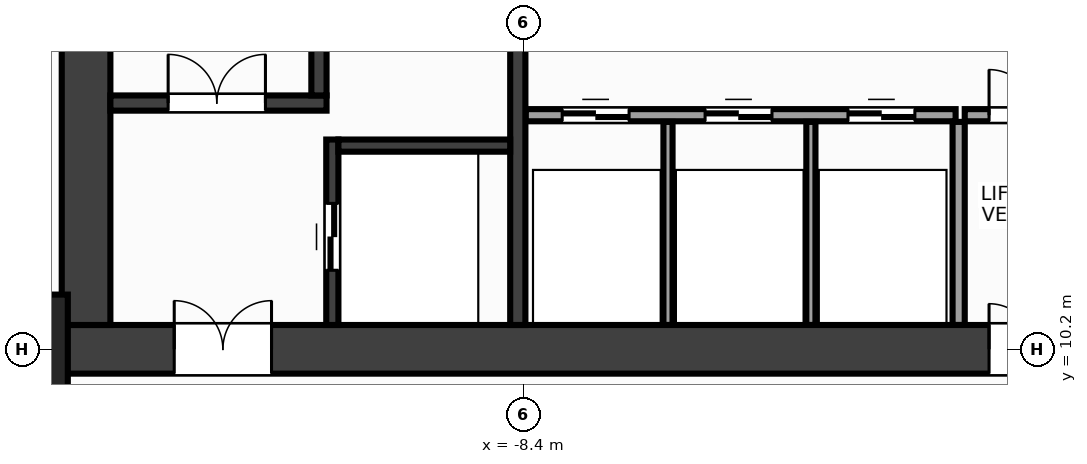
"""IFC4 building model, lengths in metres.
Left out: names, types, materials, properties, quantities, classifications, styles, units other than length and angle.
Written with IfcOpenShell. Run it as: python <this file> out.ifc"""

import sys

from ifc_helpers import new_model, si_unit, direction, frame, frame_2d, origin, origin_2d, place, context, subcontext, project, spatial, rectangle, extrude, source, transform, mapped, element, fill, save


model = new_model("IFC4")
c1 = context("Model", 3, precision=1e-05, world=origin(), true_north=direction((0.0, 1.0)))
c2 = subcontext(c1, "Body", "Model", "MODEL_VIEW")
j1 = project(units=[si_unit("LENGTHUNIT", "METRE"), si_unit("PLANEANGLEUNIT", "RADIAN")], contexts=[c1])
p1 = place(None, origin())
s1 = spatial("IfcSite", under=j1, at=p1, CompositionType="ELEMENT")
p2 = place(p1, origin())
s2 = spatial("IfcBuilding", under=s1, at=p2, CompositionType="ELEMENT")
p3 = place(p2, frame((0.0, 0.0, 48.8)))
s3 = spatial("IfcBuildingStorey", under=s2, at=p3, CompositionType="ELEMENT", Elevation=48.8)
m1 = source(origin(), c2, "Body", "SweptSolid", [
    extrude(rectangle(XDim=32.0, YDim=0.8, at=frame_2d((16.0, 0.0))), origin(), (0.0, 0.0, 1.0), 3.6),
])
p4 = place(p3, frame((-16.0, 10.2, 0.0), z_axis=(0.0, 0.0, 1.0), x_axis=(1.0, 0.0, 0.0)))
e1 = element("IfcWall", 1, at=p4, inside=s3, PredefinedType="SHEAR", context=c2, shape_type="MappedRepresentation", body=[
    mapped(m1, transform((0.0, 0.0, 0.0), x_axis=(1.0, 0.0, 0.0), y_axis=(0.0, 1.0, 0.0), z_axis=(0.0, 0.0, 1.0), scale=1.0)),
])
p5 = place(p4, frame((1.85, 0.0, 0.0)))
e2 = element("IfcOpeningElement", 2, at=p5, cuts=e1, PredefinedType="OPENING", context=c2, shape_type="SweptSolid", body=[
    extrude(rectangle(XDim=1.6, YDim=2.15, at=frame_2d((0.8, 1.075))), frame((0.0, 0.412, 0.0), z_axis=(0.0, -1.0, 0.0), x_axis=(1.0, 0.0, 0.0)), (0.0, 0.0, 1.0), 0.824),
])
p6 = place(p4, frame((28.55, 0.0, 0.0)))
e3 = element("IfcOpeningElement", 3, at=p6, cuts=e1, PredefinedType="OPENING", context=c2, shape_type="SweptSolid", body=[
    extrude(rectangle(XDim=1.6, YDim=2.15, at=frame_2d((0.8, 1.075))), frame((0.0, 0.412, 0.0), z_axis=(0.0, -1.0, 0.0), x_axis=(1.0, 0.0, 0.0)), (0.0, 0.0, 1.0), 0.824),
])
p7 = place(p4, frame((15.25, 0.0, 0.0)))
e4 = element("IfcOpeningElement", 4, at=p7, cuts=e1, PredefinedType="OPENING", context=c2, shape_type="SweptSolid", body=[
    extrude(rectangle(XDim=1.5, YDim=2.2, at=frame_2d((0.75, 1.1))), frame((0.0, 0.412, 0.0), z_axis=(0.0, -1.0, 0.0), x_axis=(1.0, 0.0, 0.0)), (0.0, 0.0, 1.0), 0.824),
])
m2 = source(origin(), c2, "Body", "SweptSolid", [
    extrude(rectangle(XDim=12.8, YDim=0.8, at=frame_2d((6.4, 0.0))), origin(), (0.0, 0.0, 1.0), 3.6),
])
p8 = place(p3, frame((-15.6, 10.6, 0.0), z_axis=(0.0, 0.0, 1.0), x_axis=(0.0, 1.0, 0.0)))
e5 = element("IfcWall", 5, at=p8, inside=s3, PredefinedType="SHEAR", context=c2, shape_type="MappedRepresentation", body=[
    mapped(m2, transform((0.0, 0.0, 0.0), x_axis=(1.0, 0.0, 0.0), y_axis=(0.0, 1.0, 0.0), z_axis=(0.0, 0.0, 1.0), scale=1.0)),
])
m3 = source(origin(), c2, "Body", "SweptSolid", [
    extrude(rectangle(XDim=12.8, YDim=0.25, at=frame_2d((6.4, 0.0))), origin(), (0.0, 0.0, 1.0), 3.6),
])
p9 = place(p3, frame((-8.5, 10.6, 0.0), z_axis=(0.0, 0.0, 1.0), x_axis=(0.0, 1.0, 0.0)))
e6 = element("IfcWall", 6, at=p9, inside=s3, PredefinedType="SHEAR", context=c2, shape_type="MappedRepresentation", body=[
    mapped(m3, transform((0.0, 0.0, 0.0), x_axis=(1.0, 0.0, 0.0), y_axis=(0.0, 1.0, 0.0), z_axis=(0.0, 0.0, 1.0), scale=1.0)),
])
p10 = place(p9, frame((5.9, 0.0, 0.0)))
e7 = element("IfcOpeningElement", 7, at=p10, cuts=e6, PredefinedType="OPENING", context=c2, shape_type="SweptSolid", body=[
    extrude(rectangle(XDim=0.95, YDim=2.15, at=frame_2d((0.475, 1.075))), frame((0.0, 0.137, 0.0), z_axis=(0.0, -1.0, 0.0), x_axis=(1.0, 0.0, 0.0)), (0.0, 0.0, 1.0), 0.274),
])
m4 = source(origin(), c2, "Body", "SweptSolid", [
    extrude(rectangle(XDim=3.555, YDim=0.25, at=frame_2d((1.777, 0.0))), origin(), (0.0, 0.0, 1.0), 3.6),
])
p11 = place(p3, frame((-15.2, 14.25, 0.0), z_axis=(0.0, 0.0, 1.0), x_axis=(1.0, 0.0, 0.0)))
e8 = element("IfcWall", 8, at=p11, inside=s3, PredefinedType="SHEAR", context=c2, shape_type="MappedRepresentation", body=[
    mapped(m4, transform((0.0, 0.0, 0.0), x_axis=(1.0, 0.0, 0.0), y_axis=(0.0, 1.0, 0.0), z_axis=(0.0, 0.0, 1.0), scale=1.0)),
])
p12 = place(p11, frame((0.95, 0.0, 0.0)))
e9 = element("IfcOpeningElement", 9, at=p12, cuts=e8, PredefinedType="OPENING", context=c2, shape_type="SweptSolid", body=[
    extrude(rectangle(XDim=1.6, YDim=2.15, at=frame_2d((0.8, 1.075))), frame((0.0, 0.137, 0.0), z_axis=(0.0, -1.0, 0.0), x_axis=(1.0, 0.0, 0.0)), (0.0, 0.0, 1.0), 0.274),
])
m5 = source(origin(), c2, "Body", "SweptSolid", [
    extrude(rectangle(XDim=9.025, YDim=0.25, at=frame_2d((4.512, 0.0))), origin(), (0.0, 0.0, 1.0), 3.6),
])
p13 = place(p3, frame((-11.77, 14.375, 0.0), z_axis=(0.0, 0.0, 1.0), x_axis=(0.0, 1.0, 0.0)))
e10 = element("IfcWall", 10, at=p13, inside=s3, PredefinedType="SHEAR", context=c2, shape_type="MappedRepresentation", body=[
    mapped(m5, transform((0.0, 0.0, 0.0), x_axis=(1.0, 0.0, 0.0), y_axis=(0.0, 1.0, 0.0), z_axis=(0.0, 0.0, 1.0), scale=1.0)),
])
m6 = source(origin(), c2, "Body", "SweptSolid", [
    extrude(rectangle(XDim=3.05, YDim=0.2, at=frame_2d((1.525, 0.0))), origin(), (0.0, 0.0, 1.0), 3.6),
])
p14 = place(p3, frame((-11.55, 10.6, 0.0), z_axis=(0.0, 0.0, 1.0), x_axis=(0.0, 1.0, 0.0)))
e11 = element("IfcWall", 11, at=p14, inside=s3, PredefinedType="SHEAR", context=c2, shape_type="MappedRepresentation", body=[
    mapped(m6, transform((0.0, 0.0, 0.0), x_axis=(1.0, 0.0, 0.0), y_axis=(0.0, 1.0, 0.0), z_axis=(0.0, 0.0, 1.0), scale=1.0)),
])
p15 = place(p14, frame((0.9, 0.0, 0.0)))
e12 = element("IfcOpeningElement", 12, at=p15, cuts=e11, PredefinedType="OPENING", context=c2, shape_type="SweptSolid", body=[
    extrude(rectangle(XDim=1.1, YDim=2.15, at=frame_2d((0.55, 1.075))), frame((0.0, 0.112, 0.0), z_axis=(0.0, -1.0, 0.0), x_axis=(1.0, 0.0, 0.0)), (0.0, 0.0, 1.0), 0.224),
])
m7 = source(origin(), c2, "Body", "SweptSolid", [
    extrude(rectangle(XDim=2.825, YDim=0.2, at=frame_2d((1.413, 0.0))), origin(), (0.0, 0.0, 1.0), 3.6),
])
p16 = place(p3, frame((-11.45, 13.55, 0.0), z_axis=(0.0, 0.0, 1.0), x_axis=(1.0, 0.0, 0.0)))
e13 = element("IfcWall", 13, at=p16, inside=s3, PredefinedType="SHEAR", context=c2, shape_type="MappedRepresentation", body=[
    mapped(m7, transform((0.0, 0.0, 0.0), x_axis=(1.0, 0.0, 0.0), y_axis=(0.0, 1.0, 0.0), z_axis=(0.0, 0.0, 1.0), scale=1.0)),
])
m8 = source(origin(), c2, "Body", "SweptSolid", [
    extrude(rectangle(XDim=1.8, YDim=1.8, at=origin_2d()), origin(), (0.0, 0.0, 1.0), 3.6),
])
p17 = place(p3, frame((-16.8, 10.2, 0.0), z_axis=(0.0, 0.0, 1.0), x_axis=(1.0, 0.0, 0.0)))
e14 = element("IfcColumn", 14, at=p17, inside=s3, PredefinedType="COLUMN", context=c2, shape_type="MappedRepresentation", body=[
    mapped(m8, transform((0.0, 0.0, 0.0), x_axis=(1.0, 0.0, 0.0), y_axis=(0.0, 1.0, 0.0), z_axis=(0.0, 0.0, 1.0), scale=1.0)),
])
m9 = source(origin(), c2, "Body", "SweptSolid", [
    extrude(rectangle(XDim=7.07, YDim=0.2, at=frame_2d((3.535, 0.0))), origin(), (0.0, 0.0, 1.0), 3.36),
])
p18 = place(p3, frame((-8.37, 14.05, 0.0), z_axis=(0.0, 0.0, 1.0), x_axis=(1.0, 0.0, 0.0)))
e15 = element("IfcWall", 15, at=p18, inside=s3, PredefinedType="PARTITIONING", context=c2, shape_type="MappedRepresentation", body=[
    mapped(m9, transform((0.0, 0.0, 0.0), x_axis=(1.0, 0.0, 0.0), y_axis=(0.0, 1.0, 0.0), z_axis=(0.0, 0.0, 1.0), scale=1.0)),
])
p19 = place(p18, frame((0.6, 0.0, 0.0)))
e16 = element("IfcOpeningElement", 16, at=p19, cuts=e15, PredefinedType="OPENING", context=c2, shape_type="SweptSolid", body=[
    extrude(rectangle(XDim=1.1, YDim=2.15, at=frame_2d((0.55, 1.075))), frame((0.0, 0.112, 0.0), z_axis=(0.0, -1.0, 0.0), x_axis=(1.0, 0.0, 0.0)), (0.0, 0.0, 1.0), 0.224),
])
p20 = place(p18, frame((2.95, 0.0, 0.0)))
e17 = element("IfcOpeningElement", 17, at=p20, cuts=e15, PredefinedType="OPENING", context=c2, shape_type="SweptSolid", body=[
    extrude(rectangle(XDim=1.1, YDim=2.15, at=frame_2d((0.55, 1.075))), frame((0.0, 0.112, 0.0), z_axis=(0.0, -1.0, 0.0), x_axis=(1.0, 0.0, 0.0)), (0.0, 0.0, 1.0), 0.224),
])
p21 = place(p18, frame((5.3, 0.0, 0.0)))
e18 = element("IfcOpeningElement", 18, at=p21, cuts=e15, PredefinedType="OPENING", context=c2, shape_type="SweptSolid", body=[
    extrude(rectangle(XDim=1.1, YDim=2.15, at=frame_2d((0.55, 1.075))), frame((0.0, 0.112, 0.0), z_axis=(0.0, -1.0, 0.0), x_axis=(1.0, 0.0, 0.0)), (0.0, 0.0, 1.0), 0.224),
])
m10 = source(origin(), c2, "Body", "SweptSolid", [
    extrude(rectangle(XDim=3.34, YDim=0.2, at=frame_2d((1.67, 0.0))), origin(), (0.0, 0.0, 1.0), 3.36),
])
p22 = place(p3, frame((-1.25, 10.6, 0.0), z_axis=(0.0, 0.0, 1.0), x_axis=(0.0, 1.0, 0.0)))
e19 = element("IfcWall", 19, at=p22, inside=s3, PredefinedType="PARTITIONING", context=c2, shape_type="MappedRepresentation", body=[
    mapped(m10, transform((0.0, 0.0, 0.0), x_axis=(1.0, 0.0, 0.0), y_axis=(0.0, 1.0, 0.0), z_axis=(0.0, 0.0, 1.0), scale=1.0)),
])
m11 = source(origin(), c2, "Body", "SweptSolid", [
    extrude(rectangle(XDim=2.3, YDim=0.2, at=frame_2d((1.15, 0.0))), origin(), (0.0, 0.0, 1.0), 3.36),
])
p23 = place(p3, frame((-1.15, 14.05, 0.0), z_axis=(0.0, 0.0, 1.0), x_axis=(1.0, 0.0, 0.0)))
e20 = element("IfcWall", 20, at=p23, inside=s3, PredefinedType="PARTITIONING", context=c2, shape_type="MappedRepresentation", body=[
    mapped(m11, transform((0.0, 0.0, 0.0), x_axis=(1.0, 0.0, 0.0), y_axis=(0.0, 1.0, 0.0), z_axis=(0.0, 0.0, 1.0), scale=1.0)),
])
p24 = place(p23, frame((0.4, 0.0, 0.0)))
e21 = element("IfcOpeningElement", 21, at=p24, cuts=e20, PredefinedType="OPENING", context=c2, shape_type="SweptSolid", body=[
    extrude(rectangle(XDim=1.5, YDim=2.2, at=frame_2d((0.75, 1.1))), frame((0.0, 0.112, 0.0), z_axis=(0.0, -1.0, 0.0), x_axis=(1.0, 0.0, 0.0)), (0.0, 0.0, 1.0), 0.224),
])
m12 = source(origin(), c2, "Body", "SweptSolid", [
    extrude(rectangle(XDim=3.34, YDim=0.15, at=frame_2d((1.67, 0.0))), origin(), (0.0, 0.0, 1.0), 3.36),
])
for number, where, z_axis, x_axis in (
    (22, (-6.03, 10.6, 0.0), (0.0, 0.0, 1.0), (0.0, 1.0, 0.0)),
    (23, (-3.68, 10.6, 0.0), (0.0, 0.0, 1.0), (0.0, 1.0, 0.0)),
):
    element("IfcWall", number, at=place(p3, frame(where, z_axis=z_axis, x_axis=x_axis)), inside=s3, PredefinedType="PARTITIONING", context=c2, shape_type="MappedRepresentation", body=[
        mapped(m12, transform((0.0, 0.0, 0.0), x_axis=(1.0, 0.0, 0.0), y_axis=(0.0, 1.0, 0.0), z_axis=(0.0, 0.0, 1.0), scale=1.0)),
    ])
m13 = source(origin(), c2, "Body", "SweptSolid", [
    extrude(rectangle(XDim=1.6, YDim=2.15, at=frame_2d((0.8, 1.075))), frame((0.0, 0.025, 0.0), z_axis=(0.0, -1.0, 0.0), x_axis=(1.0, 0.0, 0.0)), (0.0, 0.0, 1.0), 0.05),
])
p25 = place(p12, origin())
e24 = element("IfcDoor", 24, at=p25, inside=s3, OperationType="DOUBLE_DOOR_SINGLE_SWING", PredefinedType="DOOR", context=c2, shape_type="MappedRepresentation", body=[
    mapped(m13, transform((0.0, 0.0, 0.0), x_axis=(1.0, 0.0, 0.0), y_axis=(0.0, 1.0, 0.0), z_axis=(0.0, 0.0, 1.0), scale=1.0)),
])
fill(e9, e24)
p26 = place(p5, origin())
e25 = element("IfcDoor", 25, at=p26, inside=s3, OperationType="DOUBLE_DOOR_SINGLE_SWING", PredefinedType="DOOR", context=c2, shape_type="MappedRepresentation", body=[
    mapped(m13, transform((0.0, 0.0, 0.0), x_axis=(1.0, 0.0, 0.0), y_axis=(0.0, 1.0, 0.0), z_axis=(0.0, 0.0, 1.0), scale=1.0)),
])
fill(e2, e25)
m14 = source(origin(), c2, "Body", "SweptSolid", [
    extrude(rectangle(XDim=1.1, YDim=2.15, at=frame_2d((0.55, 1.075))), frame((0.0, 0.025, 0.0), z_axis=(0.0, -1.0, 0.0), x_axis=(1.0, 0.0, 0.0)), (0.0, 0.0, 1.0), 0.05),
])
p27 = place(p15, origin())
e26 = element("IfcDoor", 26, at=p27, inside=s3, OperationType="DOUBLE_DOOR_SLIDING", PredefinedType="DOOR", context=c2, shape_type="MappedRepresentation", body=[
    mapped(m14, transform((0.0, 0.0, 0.0), x_axis=(1.0, 0.0, 0.0), y_axis=(0.0, 1.0, 0.0), z_axis=(0.0, 0.0, 1.0), scale=1.0)),
])
fill(e12, e26)
p28 = place(p19, origin())
e27 = element("IfcDoor", 27, at=p28, inside=s3, OperationType="DOUBLE_DOOR_SLIDING", PredefinedType="DOOR", context=c2, shape_type="MappedRepresentation", body=[
    mapped(m14, transform((0.0, 0.0, 0.0), x_axis=(1.0, 0.0, 0.0), y_axis=(0.0, 1.0, 0.0), z_axis=(0.0, 0.0, 1.0), scale=1.0)),
])
fill(e16, e27)
p29 = place(p20, origin())
e28 = element("IfcDoor", 28, at=p29, inside=s3, OperationType="DOUBLE_DOOR_SLIDING", PredefinedType="DOOR", context=c2, shape_type="MappedRepresentation", body=[
    mapped(m14, transform((0.0, 0.0, 0.0), x_axis=(1.0, 0.0, 0.0), y_axis=(0.0, 1.0, 0.0), z_axis=(0.0, 0.0, 1.0), scale=1.0)),
])
fill(e17, e28)
p30 = place(p21, origin())
e29 = element("IfcDoor", 29, at=p30, inside=s3, OperationType="DOUBLE_DOOR_SLIDING", PredefinedType="DOOR", context=c2, shape_type="MappedRepresentation", body=[
    mapped(m14, transform((0.0, 0.0, 0.0), x_axis=(1.0, 0.0, 0.0), y_axis=(0.0, 1.0, 0.0), z_axis=(0.0, 0.0, 1.0), scale=1.0)),
])
fill(e18, e29)
m15 = source(origin(), c2, "Body", "SweptSolid", [
    extrude(rectangle(XDim=1.5, YDim=2.2, at=frame_2d((0.75, 1.1))), frame((0.0, 0.025, 0.0), z_axis=(0.0, -1.0, 0.0), x_axis=(1.0, 0.0, 0.0)), (0.0, 0.0, 1.0), 0.05),
])
p31 = place(p24, origin())
e30 = element("IfcDoor", 30, at=p31, inside=s3, OperationType="DOUBLE_DOOR_SINGLE_SWING", PredefinedType="DOOR", context=c2, shape_type="MappedRepresentation", body=[
    mapped(m15, transform((0.0, 0.0, 0.0), x_axis=(1.0, 0.0, 0.0), y_axis=(0.0, 1.0, 0.0), z_axis=(0.0, 0.0, 1.0), scale=1.0)),
])
fill(e21, e30)
p32 = place(p7, origin())
e31 = element("IfcDoor", 31, at=p32, inside=s3, OperationType="DOUBLE_DOOR_SINGLE_SWING", PredefinedType="DOOR", context=c2, shape_type="MappedRepresentation", body=[
    mapped(m15, transform((0.0, 0.0, 0.0), x_axis=(1.0, 0.0, 0.0), y_axis=(0.0, 1.0, 0.0), z_axis=(0.0, 0.0, 1.0), scale=1.0)),
])
fill(e4, e31)
save(model, sys.argv[1])
